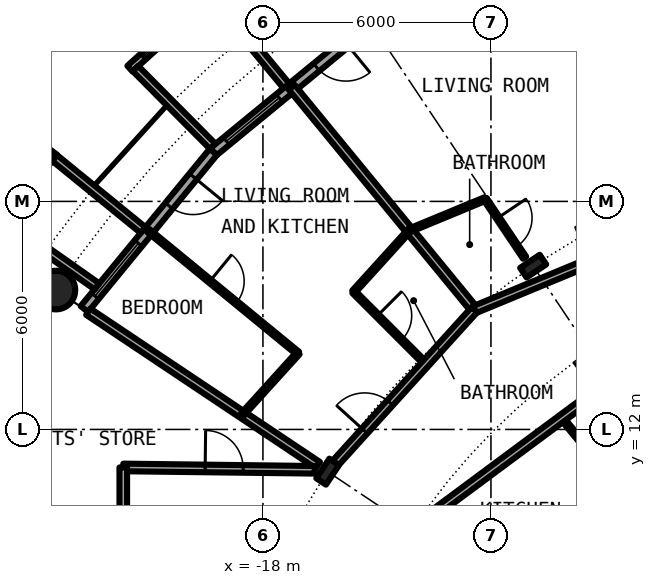
"""IFC4 building model, lengths in metres.
Left out: names, types, materials, properties, quantities, classifications, styles, units other than length and angle.
Written with IfcOpenShell. Run it as: python <this file> out.ifc"""

import sys

from ifc_helpers import new_model, si_unit, direction, frame, frame_2d, origin, origin_2d, place, context, subcontext, project, spatial, rectangle, circle, hollow_circle, i_section, extrude, element, fill, save


model = new_model("IFC4")
c1 = context("Model", 3, precision=1e-05, world=origin(), true_north=direction((0.0, 1.0)))
c2 = subcontext(c1, "Body", "Model", "MODEL_VIEW")
j1 = project(units=[si_unit("LENGTHUNIT", "METRE"), si_unit("PLANEANGLEUNIT", "RADIAN")], contexts=[c1])
p1 = place(None, origin())
s1 = spatial("IfcSite", under=j1, at=p1, CompositionType="ELEMENT")
p2 = place(p1, origin())
s2 = spatial("IfcBuilding", under=s1, at=p2, CompositionType="ELEMENT")
p3 = place(p2, frame((0.0, 0.0, 50.25)))
s3 = spatial("IfcBuildingStorey", under=s2, at=p3, CompositionType="ELEMENT", Elevation=50.25)
p4 = place(p3, frame((-23.448, 15.667, 0.0), z_axis=(0.0, 0.0, 1.0), x_axis=(1.0, 0.0, 0.0)))
e1 = element("IfcColumn", 1, at=p4, inside=s3, PredefinedType="COLUMN", context=c2, shape_type="SweptSolid", body=[
    extrude(hollow_circle(Radius=0.508, WallThickness=0.05, at=origin_2d()), origin(), (0.0, 0.0, 1.0), 3.05),
])
for number, where, z_axis, x_axis in (
    (2, (-10.889, 16.297, 0.0), (0.0, 0.0, 1.0), (-0.556, 0.831, 0.0)),
    (3, (-16.297, 10.889, 0.0), (0.0, 0.0, 1.0), (-0.831, 0.556, 0.0)),
):
    element("IfcColumn", number, at=place(p3, frame(where, z_axis=z_axis, x_axis=x_axis)), inside=s3, PredefinedType="COLUMN", context=c2, shape_type="SweptSolid", body=[
        extrude(i_section(OverallWidth=0.305, OverallDepth=0.62, WebThickness=0.021, FlangeThickness=0.04, FilletRadius=0.027, at=origin_2d()), origin(), (0.0, 0.0, 1.0), 3.05),
    ])
p5 = place(p3, frame((-15.167, 22.699, 0.0), z_axis=(0.0, 0.0, 1.0), x_axis=(-0.773019449054, -0.634382322723, 0.0)))
e4 = element("IfcWall", 4, at=p5, inside=s3, PredefinedType="SOLIDWALL", context=c2, shape_type="SweptSolid", body=[
    extrude(rectangle(XDim=5.352, YDim=0.25, at=frame_2d((2.676, 0.0))), origin(), (0.0, 0.0, 1.0), 2.7),
])
p6 = place(p5, frame((0.841, 0.0, 0.0)))
e5 = element("IfcOpeningElement", 5, at=p6, cuts=e4, PredefinedType="OPENING", context=c2, shape_type="SweptSolid", body=[
    extrude(rectangle(XDim=1.0, YDim=2.2, at=frame_2d((0.5, 1.1))), frame((0.0, 0.135, 0.0), z_axis=(0.0, -1.0, 0.0), x_axis=(1.0, 0.0, 0.0)), (0.0, 0.0, 1.0), 0.27),
])
p7 = place(p5, frame((3.111, 0.0, 0.3)))
e6 = element("IfcOpeningElement", 6, at=p7, cuts=e4, PredefinedType="OPENING", context=c2, shape_type="SweptSolid", body=[
    extrude(rectangle(XDim=1.8, YDim=2.1, at=frame_2d((0.9, 1.05))), frame((0.0, 0.135, 0.0), z_axis=(0.0, -1.0, 0.0), x_axis=(1.0, 0.0, 0.0)), (0.0, 0.0, 1.0), 0.27),
])
p8 = place(p3, frame((-19.282, 23.503, -0.03), z_axis=(0.0, 0.0, 1.0), x_axis=(-0.740998365753, -0.671506829416, 0.0)))
e7 = element("IfcWall", 7, at=p8, inside=s3, PredefinedType="SOLIDWALL", context=c2, shape_type="SweptSolid", body=[
    extrude(rectangle(XDim=2.993, YDim=0.2, at=frame_2d((1.497, 0.0))), origin(), (0.0, 0.0, 1.0), 2.73),
])
p9 = place(p8, frame((0.457, 0.0, 0.33)))
e8 = element("IfcOpeningElement", 8, at=p9, cuts=e7, PredefinedType="OPENING", context=c2, shape_type="SweptSolid", body=[
    extrude(circle(Radius=1.04, at=frame_2d((1.04, 1.04))), frame((0.0, 0.11, 0.0), z_axis=(0.0, -1.0, 0.0), x_axis=(1.0, 0.0, 0.0)), (0.0, 0.0, 1.0), 0.22),
])
p10 = place(p3, frame((-17.384, 21.041, -0.03), z_axis=(0.0, 0.0, 1.0), x_axis=(-0.63709551667, 0.770784861449, 0.0)))
e9 = element("IfcWall", 9, at=p10, inside=s3, PredefinedType="SOLIDWALL", context=c2, shape_type="SweptSolid", body=[
    extrude(rectangle(XDim=3.006, YDim=0.2, at=frame_2d((1.503, 0.0))), origin(), (0.0, 0.0, 1.0), 2.73),
])
p11 = place(p3, frame((-19.323, 19.45, -0.03), z_axis=(0.0, 0.0, 1.0), x_axis=(-0.704476739375, 0.709727076896, 0.0)))
e10 = element("IfcWall", 10, at=p11, inside=s3, PredefinedType="SOLIDWALL", context=c2, shape_type="SweptSolid", body=[
    extrude(rectangle(XDim=2.883, YDim=0.2, at=frame_2d((1.441, 0.0))), origin(), (0.0, 0.0, 1.0), 2.73),
])
p12 = place(p3, frame((-19.304, 19.304, 0.0), z_axis=(0.0, 0.0, 1.0), x_axis=(-0.634382322723, -0.773019449054, 0.0)))
e11 = element("IfcWall", 11, at=p12, inside=s3, PredefinedType="SOLIDWALL", context=c2, shape_type="SweptSolid", body=[
    extrude(rectangle(XDim=5.352, YDim=0.25, at=frame_2d((2.676, 0.0))), origin(), (0.0, 0.0, 1.0), 2.7),
])
p13 = place(p12, frame((0.841, 0.0, 0.0)))
e12 = element("IfcOpeningElement", 12, at=p13, cuts=e11, PredefinedType="OPENING", context=c2, shape_type="SweptSolid", body=[
    extrude(rectangle(XDim=1.0, YDim=2.2, at=frame_2d((0.5, 1.1))), frame((0.0, 0.135, 0.0), z_axis=(0.0, -1.0, 0.0), x_axis=(1.0, 0.0, 0.0)), (0.0, 0.0, 1.0), 0.27),
])
p14 = place(p12, frame((3.111, 0.0, 0.3)))
e13 = element("IfcOpeningElement", 13, at=p14, cuts=e11, PredefinedType="OPENING", context=c2, shape_type="SweptSolid", body=[
    extrude(rectangle(XDim=1.8, YDim=2.1, at=frame_2d((0.9, 1.05))), frame((0.0, 0.135, 0.0), z_axis=(0.0, -1.0, 0.0), x_axis=(1.0, 0.0, 0.0)), (0.0, 0.0, 1.0), 0.27),
])
p15 = place(p3, frame((-23.497, 19.289, -0.03), z_axis=(0.0, 0.0, 1.0), x_axis=(-0.60418752353, -0.796842165306, 0.0)))
e14 = element("IfcWall", 14, at=p15, inside=s3, PredefinedType="SOLIDWALL", context=c2, shape_type="SweptSolid", body=[
    extrude(rectangle(XDim=2.337, YDim=0.2, at=frame_2d((1.168, 0.0))), origin(), (0.0, 0.0, 1.0), 2.73),
])
p16 = place(p15, frame((0.128, 0.0, 0.33)))
e15 = element("IfcOpeningElement", 15, at=p16, cuts=e14, PredefinedType="OPENING", context=c2, shape_type="SweptSolid", body=[
    extrude(circle(Radius=1.04, at=frame_2d((1.04, 1.04))), frame((0.0, 0.11, 0.0), z_axis=(0.0, -1.0, 0.0), x_axis=(1.0, 0.0, 0.0)), (0.0, 0.0, 1.0), 0.22),
])
p17 = place(p3, frame((-21.155, 17.246, -0.03), z_axis=(0.0, 0.0, 1.0), x_axis=(-0.775179004516, 0.631741648902, 0.0)))
e16 = element("IfcWall", 16, at=p17, inside=s3, PredefinedType="SOLIDWALL", context=c2, shape_type="SweptSolid", body=[
    extrude(rectangle(XDim=3.006, YDim=0.2, at=frame_2d((1.503, 0.0))), origin(), (0.0, 0.0, 1.0), 2.73),
])
p18 = place(p3, frame((-22.37, 15.765, -0.03), z_axis=(0.0, 0.0, 1.0), x_axis=(-0.817256123454, 0.576274612209, 0.0)))
e17 = element("IfcWall", 17, at=p18, inside=s3, PredefinedType="SOLIDWALL", context=c2, shape_type="SweptSolid", body=[
    extrude(rectangle(XDim=2.933, YDim=0.2, at=frame_2d((1.466, 0.0))), origin(), (0.0, 0.0, 1.0), 2.73),
])
p19 = place(p3, frame((-10.398, 25.107, 0.0), z_axis=(0.0, 0.0, 1.0), x_axis=(0.382458509789, -0.923972666419, 0.0)))
e18 = element("IfcWall", 18, at=p19, inside=s3, PredefinedType="PARTITIONING", context=c2, shape_type="SweptSolid", body=[
    extrude(rectangle(XDim=8.419, YDim=0.1, at=frame_2d((4.209, 0.0))), origin(), (0.0, 0.0, 1.0), 2.7),
])
p20 = place(p19, frame((6.677, 0.0, 0.0)))
e19 = element("IfcOpeningElement", 19, at=p20, cuts=e18, PredefinedType="OPENING", context=c2, shape_type="SweptSolid", body=[
    extrude(rectangle(XDim=0.9, YDim=2.3, at=frame_2d((0.45, 1.15))), frame((0.0, 0.06, 0.0), z_axis=(0.0, -1.0, 0.0), x_axis=(1.0, 0.0, 0.0)), (0.0, 0.0, 1.0), 0.12),
])
p21 = place(p19, frame((2.468, 0.0, 0.0)))
e20 = element("IfcOpeningElement", 20, at=p21, cuts=e18, PredefinedType="OPENING", context=c2, shape_type="SweptSolid", body=[
    extrude(rectangle(XDim=0.9, YDim=2.3, at=frame_2d((0.45, 1.15))), frame((0.0, 0.06, 0.0), z_axis=(0.0, -1.0, 0.0), x_axis=(1.0, 0.0, 0.0)), (0.0, 0.0, 1.0), 0.12),
])
p22 = place(p3, frame((-22.596, 15.097, 0.0), z_axis=(0.0, 0.0, 1.0), x_axis=(0.831507055747, -0.555514190857, 0.0)))
e21 = element("IfcWall", 21, at=p22, inside=s3, PredefinedType="PARTITIONING", context=c2, shape_type="SweptSolid", body=[
    extrude(rectangle(XDim=7.265, YDim=0.2, at=frame_2d((3.633, 0.0))), origin(), (0.0, 0.0, 1.0), 2.7),
])
p23 = place(p3, frame((-21.014, 17.231, 0.0), z_axis=(0.0, 0.0, 1.0), x_axis=(0.773219330916, -0.634138680651, 0.0)))
e22 = element("IfcWall", 22, at=p23, inside=s3, PredefinedType="PARTITIONING", context=c2, shape_type="SweptSolid", body=[
    extrude(rectangle(XDim=5.089, YDim=0.1, at=frame_2d((2.544, 0.0))), origin(), (0.0, 0.0, 1.0), 2.7),
])
p24 = place(p23, frame((2.095, 0.0, 0.0)))
e23 = element("IfcOpeningElement", 23, at=p24, cuts=e22, PredefinedType="OPENING", context=c2, shape_type="SweptSolid", body=[
    extrude(rectangle(XDim=0.9, YDim=2.3, at=frame_2d((0.45, 1.15))), frame((0.0, 0.06, 0.0), z_axis=(0.0, -1.0, 0.0), x_axis=(1.0, 0.0, 0.0)), (0.0, 0.0, 1.0), 0.12),
])
p25 = place(p3, frame((-17.243, 21.005, 0.0), z_axis=(0.0, 0.0, 1.0), x_axis=(0.63447412651, -0.772944100689, 0.0)))
e24 = element("IfcWall", 24, at=p25, inside=s3, PredefinedType="PARTITIONING", context=c2, shape_type="SweptSolid", body=[
    extrude(rectangle(XDim=7.576, YDim=0.2, at=frame_2d((3.788, 0.0))), origin(), (0.0, 0.0, 1.0), 2.7),
])
p26 = place(p3, frame((-15.612, 15.622, 0.0), z_axis=(0.0, 0.0, 1.0), x_axis=(0.706741540154, -0.707471833659, 0.0)))
e25 = element("IfcWall", 25, at=p26, inside=s3, PredefinedType="PARTITIONING", context=c2, shape_type="SweptSolid", body=[
    extrude(rectangle(XDim=2.674, YDim=0.1, at=frame_2d((1.337, 0.0))), origin(), (0.0, 0.0, 1.0), 2.7),
])
p27 = place(p26, frame((0.887, 0.0, 0.0)))
e26 = element("IfcOpeningElement", 26, at=p27, cuts=e25, PredefinedType="OPENING", context=c2, shape_type="SweptSolid", body=[
    extrude(rectangle(XDim=0.9, YDim=2.3, at=frame_2d((0.45, 1.15))), frame((0.0, 0.06, 0.0), z_axis=(0.0, -1.0, 0.0), x_axis=(1.0, 0.0, 0.0)), (0.0, 0.0, 1.0), 0.12),
])
p28 = place(p3, frame((-12.153, 18.064, 0.0), z_axis=(0.0, 0.0, 1.0), x_axis=(0.558084773293, -0.829783939239, 0.0)))
e27 = element("IfcWall", 27, at=p28, inside=s3, PredefinedType="PARTITIONING", context=c2, shape_type="SweptSolid", body=[
    extrude(rectangle(XDim=1.862, YDim=0.1, at=frame_2d((0.931, 0.0))), origin(), (0.0, 0.0, 1.0), 2.7),
])
p29 = place(p28, frame((0.6, 0.0, 0.0)))
e28 = element("IfcOpeningElement", 28, at=p29, cuts=e27, PredefinedType="OPENING", context=c2, shape_type="SweptSolid", body=[
    extrude(rectangle(XDim=0.9, YDim=2.3, at=frame_2d((0.45, 1.15))), frame((0.0, 0.06, 0.0), z_axis=(0.0, -1.0, 0.0), x_axis=(1.0, 0.0, 0.0)), (0.0, 0.0, 1.0), 0.12),
])
p30 = place(p3, frame((-10.132, 12.296, 0.0), z_axis=(0.0, 0.0, 1.0), x_axis=(0.635976043025, -0.771708800454, 0.0)))
e29 = element("IfcWall", 29, at=p30, inside=s3, PredefinedType="PARTITIONING", context=c2, shape_type="SweptSolid", body=[
    extrude(rectangle(XDim=8.213, YDim=0.1, at=frame_2d((4.106, 0.0))), origin(), (0.0, 0.0, 1.0), 2.7),
])
p31 = place(p30, frame((0.823, 0.0, 0.0)))
e30 = element("IfcOpeningElement", 30, at=p31, cuts=e29, PredefinedType="OPENING", context=c2, shape_type="SweptSolid", body=[
    extrude(rectangle(XDim=0.9, YDim=2.3, at=frame_2d((0.45, 1.15))), frame((0.0, 0.06, 0.0), z_axis=(0.0, -1.0, 0.0), x_axis=(1.0, 0.0, 0.0)), (0.0, 0.0, 1.0), 0.12),
])
p32 = place(p30, frame((4.929, 0.0, 0.0)))
e31 = element("IfcOpeningElement", 31, at=p32, cuts=e29, PredefinedType="OPENING", context=c2, shape_type="SweptSolid", body=[
    extrude(rectangle(XDim=0.9, YDim=2.3, at=frame_2d((0.45, 1.15))), frame((0.0, 0.06, 0.0), z_axis=(0.0, -1.0, 0.0), x_axis=(1.0, 0.0, 0.0)), (0.0, 0.0, 1.0), 0.12),
])
p33 = place(p3, frame((-21.675, 11.0, 0.0), z_axis=(0.0, 0.0, 1.0), x_axis=(0.99992425795, -0.012307654658, 0.0)))
e32 = element("IfcWall", 32, at=p33, inside=s3, PredefinedType="PARTITIONING", context=c2, shape_type="SweptSolid", body=[
    extrude(rectangle(XDim=5.039, YDim=0.2, at=frame_2d((2.519, 0.0))), origin(), (0.0, 0.0, 1.0), 2.7),
])
p34 = place(p33, frame((2.155, 0.0, 0.0)))
e33 = element("IfcOpeningElement", 33, at=p34, cuts=e32, PredefinedType="OPENING", context=c2, shape_type="SweptSolid", body=[
    extrude(rectangle(XDim=1.0, YDim=2.3, at=frame_2d((0.5, 1.15))), frame((0.0, 0.11, 0.0), z_axis=(0.0, -1.0, 0.0), x_axis=(1.0, 0.0, 0.0)), (0.0, 0.0, 1.0), 0.22),
])
p35 = place(p3, frame((-9.772, 9.398, 0.0), z_axis=(0.0, 0.0, 1.0), x_axis=(0.803264156882, 0.595622946392, 0.0)))
e34 = element("IfcWall", 34, at=p35, inside=s3, PredefinedType="PARTITIONING", context=c2, shape_type="SweptSolid", body=[
    extrude(rectangle(XDim=1.565, YDim=0.1, at=frame_2d((0.782, 0.0))), origin(), (0.0, 0.0, 1.0), 2.7),
])
p36 = place(p3, frame((-14.037, 9.4, 0.0), z_axis=(0.0, 0.0, 1.0), x_axis=(0.803202106898, 0.595706618626, 0.0)))
e35 = element("IfcWall", 35, at=p36, inside=s3, PredefinedType="PARTITIONING", context=c2, shape_type="SweptSolid", body=[
    extrude(rectangle(XDim=11.368, YDim=0.2, at=frame_2d((5.684, 0.0))), origin(), (0.0, 0.0, 1.0), 2.7),
])
p37 = place(p36, frame((5.988, 0.0, 0.0)))
e36 = element("IfcOpeningElement", 36, at=p37, cuts=e35, PredefinedType="OPENING", context=c2, shape_type="SweptSolid", body=[
    extrude(rectangle(XDim=1.0, YDim=2.3, at=frame_2d((0.5, 1.15))), frame((0.0, 0.11, 0.0), z_axis=(0.0, -1.0, 0.0), x_axis=(1.0, 0.0, 0.0)), (0.0, 0.0, 1.0), 0.22),
])
p38 = place(p3, frame((-12.435, 15.15, 0.0), z_axis=(0.0, 0.0, 1.0), x_axis=(0.923845560554, 0.38276543763, 0.0)))
e37 = element("IfcWall", 37, at=p38, inside=s3, PredefinedType="PARTITIONING", context=c2, shape_type="SweptSolid", body=[
    extrude(rectangle(XDim=11.381, YDim=0.2, at=frame_2d((5.69, 0.0))), origin(), (0.0, 0.0, 1.0), 2.7),
])
p39 = place(p38, frame((3.293, 0.0, 0.0)))
e38 = element("IfcOpeningElement", 38, at=p39, cuts=e37, PredefinedType="OPENING", context=c2, shape_type="SweptSolid", body=[
    extrude(rectangle(XDim=1.0, YDim=2.3, at=frame_2d((0.5, 1.15))), frame((0.0, 0.11, 0.0), z_axis=(0.0, -1.0, 0.0), x_axis=(1.0, 0.0, 0.0)), (0.0, 0.0, 1.0), 0.22),
])
p40 = place(p3, frame((-16.193, 11.003, 0.0), z_axis=(0.0, 0.0, 1.0), x_axis=(0.671514934772, 0.740991020444, 0.0)))
e39 = element("IfcWall", 39, at=p40, inside=s3, PredefinedType="PARTITIONING", context=c2, shape_type="SweptSolid", body=[
    extrude(rectangle(XDim=5.598, YDim=0.2, at=frame_2d((2.799, 0.0))), origin(), (0.0, 0.0, 1.0), 2.38),
])
p41 = place(p40, frame((1.293, 0.0, 0.0)))
e40 = element("IfcOpeningElement", 40, at=p41, cuts=e39, PredefinedType="OPENING", context=c2, shape_type="SweptSolid", body=[
    extrude(rectangle(XDim=1.0, YDim=2.3, at=frame_2d((0.5, 1.15))), frame((0.0, 0.11, 0.0), z_axis=(0.0, -1.0, 0.0), x_axis=(1.0, 0.0, 0.0)), (0.0, 0.0, 1.0), 0.22),
])
p42 = place(p3, frame((-14.149, 17.236, 0.0), z_axis=(0.0, 0.0, 1.0), x_axis=(0.923874819588, 0.382694810171, 0.0)))
e41 = element("IfcWall", 41, at=p42, inside=s3, PredefinedType="PARTITIONING", context=c2, shape_type="SweptSolid", body=[
    extrude(rectangle(XDim=2.158, YDim=0.1, at=frame_2d((1.079, 0.0))), origin(), (0.0, 0.0, 1.0), 2.7),
])
p43 = place(p3, frame((-21.675, 9.4, 0.0), z_axis=(0.0, 0.0, 1.0), x_axis=(0.0, 1.0, 0.0)))
e42 = element("IfcWall", 42, at=p43, inside=s3, PredefinedType="PARTITIONING", context=c2, shape_type="SweptSolid", body=[
    extrude(rectangle(XDim=1.6, YDim=0.2, at=frame_2d((0.8, 0.0))), origin(), (0.0, 0.0, 1.0), 2.7),
])
for number, where, z_axis, x_axis in (
    (43, (-18.538, 12.394, 0.0), (0.0, 0.0, 1.0), (0.672, 0.741, 0.0)),
    (44, (-15.613, 15.621, 0.0), (0.0, 0.0, 1.0), (0.672, 0.741, 0.0)),
):
    element("IfcWall", number, at=place(p3, frame(where, z_axis=z_axis, x_axis=x_axis)), inside=s3, PredefinedType="PARTITIONING", context=c2, shape_type="SweptSolid", body=[
        extrude(rectangle(XDim=2.183, YDim=0.1, at=frame_2d((1.091, 0.0))), origin(), (0.0, 0.0, 1.0), 2.7),
    ])
p44 = place(p6, origin())
e45 = element("IfcDoor", 45, at=p44, inside=s3, OperationType="SINGLE_SWING_LEFT", PredefinedType="DOOR", context=c2, shape_type="SweptSolid", body=[
    extrude(rectangle(XDim=1.0, YDim=2.2, at=frame_2d((0.5, 1.1))), frame((0.0, 0.025, 0.0), z_axis=(0.0, -1.0, 0.0), x_axis=(1.0, 0.0, 0.0)), (0.0, 0.0, 1.0), 0.05),
])
fill(e5, e45)
p45 = place(p7, origin())
e46 = element("IfcWindow", 46, at=p45, inside=s3, PartitioningType="SINGLE_PANEL", PredefinedType="WINDOW", context=c2, shape_type="SweptSolid", body=[
    extrude(rectangle(XDim=1.8, YDim=2.1, at=frame_2d((0.9, 1.05))), frame((0.0, 0.03, 0.0), z_axis=(0.0, -1.0, 0.0), x_axis=(1.0, 0.0, 0.0)), (0.0, 0.0, 1.0), 0.06),
])
fill(e6, e46)
p46 = place(p9, origin())
e47 = element("IfcWindow", 47, at=p46, inside=s3, PartitioningType="SINGLE_PANEL", PredefinedType="WINDOW", context=c2, shape_type="SweptSolid", body=[
    extrude(circle(Radius=1.04, at=frame_2d((1.04, 1.04))), frame((0.0, 0.03, 0.0), z_axis=(0.0, -1.0, 0.0), x_axis=(1.0, 0.0, 0.0)), (0.0, 0.0, 1.0), 0.06),
])
fill(e8, e47)
p47 = place(p13, origin())
e48 = element("IfcDoor", 48, at=p47, inside=s3, OperationType="SINGLE_SWING_LEFT", PredefinedType="DOOR", context=c2, shape_type="SweptSolid", body=[
    extrude(rectangle(XDim=1.0, YDim=2.2, at=frame_2d((0.5, 1.1))), frame((0.0, 0.025, 0.0), z_axis=(0.0, -1.0, 0.0), x_axis=(1.0, 0.0, 0.0)), (0.0, 0.0, 1.0), 0.05),
])
fill(e12, e48)
p48 = place(p14, origin())
e49 = element("IfcWindow", 49, at=p48, inside=s3, PartitioningType="SINGLE_PANEL", PredefinedType="WINDOW", context=c2, shape_type="SweptSolid", body=[
    extrude(rectangle(XDim=1.8, YDim=2.1, at=frame_2d((0.9, 1.05))), frame((0.0, 0.03, 0.0), z_axis=(0.0, -1.0, 0.0), x_axis=(1.0, 0.0, 0.0)), (0.0, 0.0, 1.0), 0.06),
])
fill(e13, e49)
p49 = place(p29, origin())
e50 = element("IfcDoor", 50, at=p49, inside=s3, OperationType="SINGLE_SWING_RIGHT", PredefinedType="DOOR", context=c2, shape_type="SweptSolid", body=[
    extrude(rectangle(XDim=0.9, YDim=2.3, at=frame_2d((0.45, 1.15))), frame((0.0, 0.025, 0.0), z_axis=(0.0, -1.0, 0.0), x_axis=(1.0, 0.0, 0.0)), (0.0, 0.0, 1.0), 0.05),
])
fill(e28, e50)
p50 = place(p41, origin())
e51 = element("IfcDoor", 51, at=p50, inside=s3, OperationType="SINGLE_SWING_LEFT", PredefinedType="DOOR", context=c2, shape_type="SweptSolid", body=[
    extrude(rectangle(XDim=1.0, YDim=2.3, at=frame_2d((0.5, 1.15))), frame((0.0, 0.025, 0.0), z_axis=(0.0, -1.0, 0.0), x_axis=(1.0, 0.0, 0.0)), (0.0, 0.0, 1.0), 0.05),
])
fill(e40, e51)
p51 = place(p27, origin())
e52 = element("IfcDoor", 52, at=p51, inside=s3, OperationType="SINGLE_SWING_RIGHT", PredefinedType="DOOR", context=c2, shape_type="SweptSolid", body=[
    extrude(rectangle(XDim=0.9, YDim=2.3, at=frame_2d((0.45, 1.15))), frame((0.0, 0.025, 0.0), z_axis=(0.0, -1.0, 0.0), x_axis=(1.0, 0.0, 0.0)), (0.0, 0.0, 1.0), 0.05),
])
fill(e26, e52)
p52 = place(p24, origin())
e53 = element("IfcDoor", 53, at=p52, inside=s3, OperationType="SINGLE_SWING_RIGHT", PredefinedType="DOOR", context=c2, shape_type="SweptSolid", body=[
    extrude(rectangle(XDim=0.9, YDim=2.3, at=frame_2d((0.45, 1.15))), frame((0.0, 0.025, 0.0), z_axis=(0.0, -1.0, 0.0), x_axis=(1.0, 0.0, 0.0)), (0.0, 0.0, 1.0), 0.05),
])
fill(e23, e53)
p53 = place(p34, origin())
e54 = element("IfcDoor", 54, at=p53, inside=s3, OperationType="SINGLE_SWING_RIGHT", PredefinedType="DOOR", context=c2, shape_type="SweptSolid", body=[
    extrude(rectangle(XDim=1.0, YDim=2.3, at=frame_2d((0.5, 1.15))), frame((0.0, 0.025, 0.0), z_axis=(0.0, -1.0, 0.0), x_axis=(1.0, 0.0, 0.0)), (0.0, 0.0, 1.0), 0.05),
])
fill(e33, e54)
save(model, sys.argv[1])
